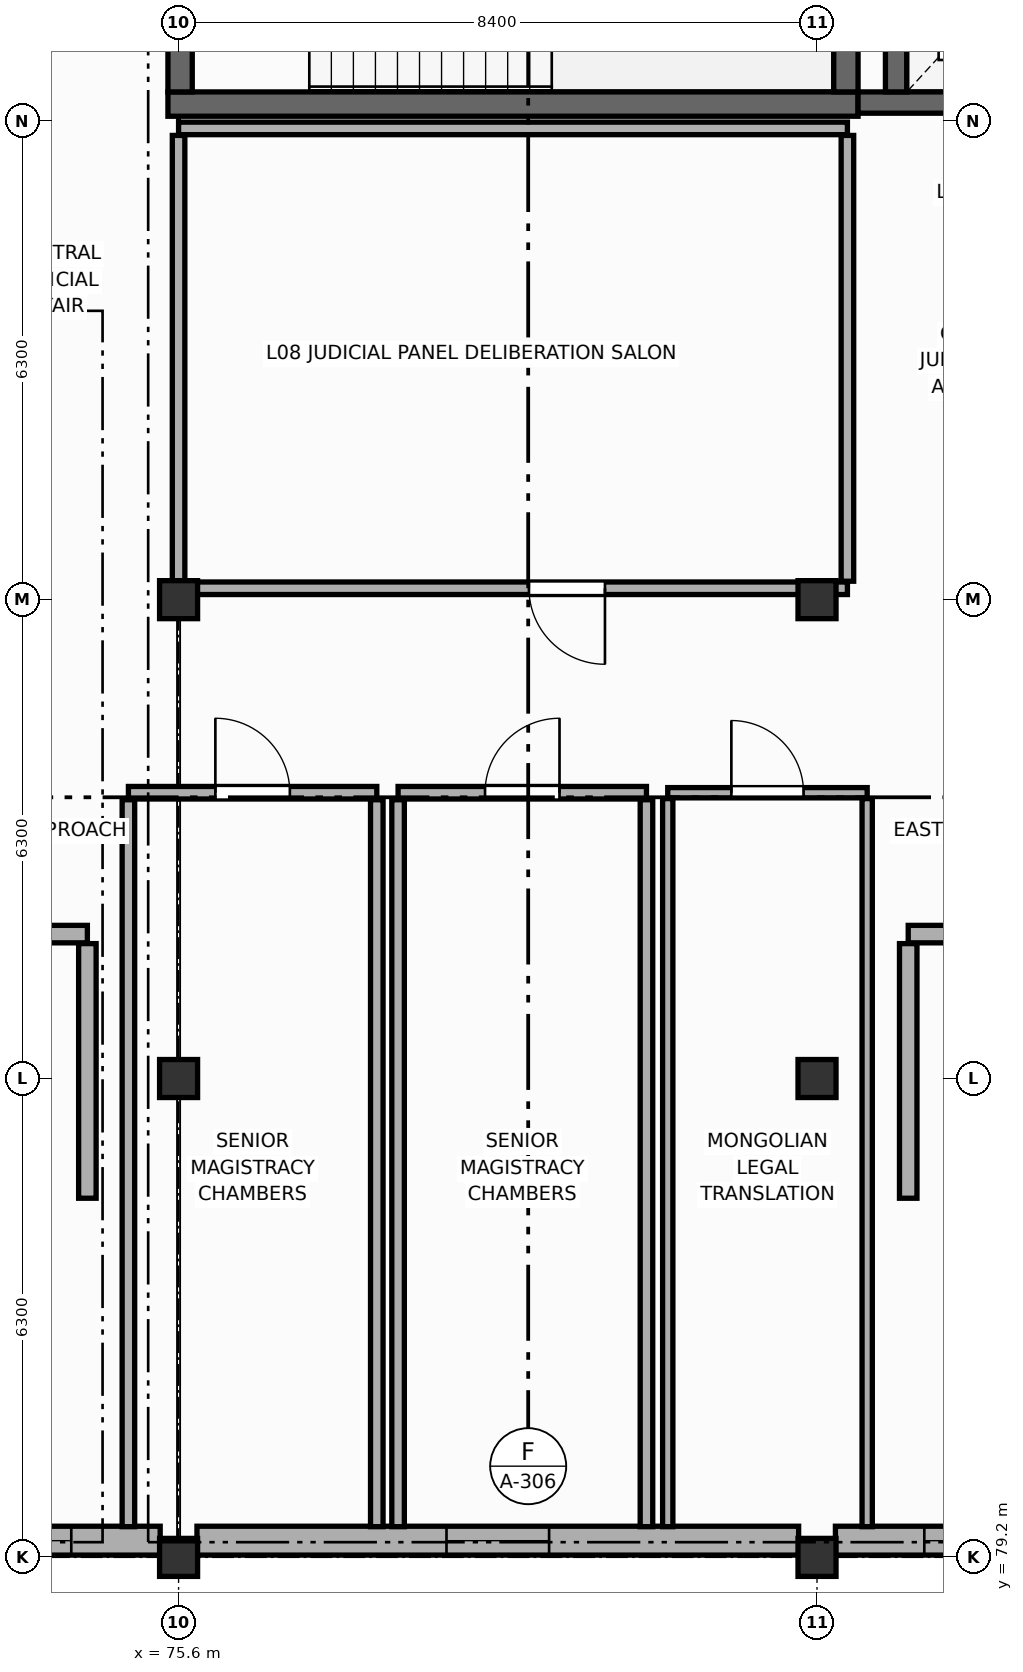
"""IFC4 building model, lengths in metres.
Left out: names, types, materials, properties, quantities, classifications, styles, units other than length and angle.
Written with IfcOpenShell. Run it as: python <this file> out.ifc"""

import sys

from ifc_helpers import new_model, si_unit, direction, frame, frame_2d, origin, origin_2d, place, context, subcontext, project, spatial, rectangle, extrude, element, fill, save


model = new_model("IFC4")
c1 = context("Model", 3, precision=1e-05, world=origin(), true_north=direction((0.0, 1.0)))
c2 = subcontext(c1, "Body", "Model", "MODEL_VIEW")
j1 = project(units=[si_unit("LENGTHUNIT", "METRE"), si_unit("PLANEANGLEUNIT", "RADIAN")], contexts=[c1])
p1 = place(None, origin())
s1 = spatial("IfcSite", under=j1, at=p1, CompositionType="ELEMENT")
p2 = place(p1, origin())
s2 = spatial("IfcBuilding", under=s1, at=p2, CompositionType="ELEMENT")
p3 = place(p2, frame((0.0, 0.0, 31.2)))
s3 = spatial("IfcBuildingStorey", under=s2, at=p3, CompositionType="ELEMENT", Elevation=31.2)
for number, where, z_axis, x_axis in (
    (1, (75.6, 79.2, 0.0), (0.0, 0.0, 1.0), (1.0, 0.0, 0.0)),
    (2, (75.6, 91.8, 0.0), (0.0, 0.0, 1.0), (1.0, 0.0, 0.0)),
    (3, (75.6, 85.5, 0.0), (0.0, 0.0, 1.0), (1.0, 0.0, 0.0)),
    (4, (84.0, 79.2, 0.0), (0.0, 0.0, 1.0), (1.0, 0.0, 0.0)),
    (5, (84.0, 91.8, 0.0), (0.0, 0.0, 1.0), (1.0, 0.0, 0.0)),
    (6, (84.0, 85.5, 0.0), (0.0, 0.0, 1.0), (1.0, 0.0, 0.0)),
):
    element("IfcColumn", number, at=place(p3, frame(where, z_axis=z_axis, x_axis=x_axis)), inside=s3, PredefinedType="COLUMN", context=c2, shape_type="SweptSolid", body=[
        extrude(rectangle(XDim=0.5, YDim=0.5, at=origin_2d()), origin(), (0.0, 0.0, 1.0), 4.2),
    ])
p4 = place(p3, frame((75.358, 79.42, 0.0), z_axis=(0.0, 0.0, 1.0), x_axis=(-1.0, 0.0, 0.0)))
e7 = element("IfcWall", 7, at=p4, inside=s3, PredefinedType="STANDARD", context=c2, shape_type="SweptSolid", body=[
    extrude(rectangle(XDim=7.916, YDim=0.38, at=frame_2d((3.958, 0.0))), origin(), (0.0, 0.0, 1.0), 3.51),
])
p5 = place(p4, frame((1.17, 0.0, 0.85)))
e8 = element("IfcOpeningElement", 8, at=p5, cuts=e7, PredefinedType="OPENING", context=c2, shape_type="SweptSolid", body=[
    extrude(rectangle(XDim=1.35, YDim=1.95, at=frame_2d((0.675, 0.975))), frame((0.0, 0.2, 0.0), z_axis=(0.0, -1.0, 0.0), x_axis=(1.0, 0.0, 0.0)), (0.0, 0.0, 1.0), 0.4),
])
p6 = place(p4, frame((3.283, 0.0, 0.85)))
e9 = element("IfcOpeningElement", 9, at=p6, cuts=e7, PredefinedType="OPENING", context=c2, shape_type="SweptSolid", body=[
    extrude(rectangle(XDim=1.35, YDim=1.95, at=frame_2d((0.675, 0.975))), frame((0.0, 0.2, 0.0), z_axis=(0.0, -1.0, 0.0), x_axis=(1.0, 0.0, 0.0)), (0.0, 0.0, 1.0), 0.4),
])
p7 = place(p4, frame((5.396, 0.0, 0.85)))
e10 = element("IfcOpeningElement", 10, at=p7, cuts=e7, PredefinedType="OPENING", context=c2, shape_type="SweptSolid", body=[
    extrude(rectangle(XDim=1.35, YDim=1.95, at=frame_2d((0.675, 0.975))), frame((0.0, 0.2, 0.0), z_axis=(0.0, -1.0, 0.0), x_axis=(1.0, 0.0, 0.0)), (0.0, 0.0, 1.0), 0.4),
])
p8 = place(p3, frame((83.758, 79.42, 0.0), z_axis=(0.0, 0.0, 1.0), x_axis=(-1.0, 0.0, 0.0)))
e11 = element("IfcWall", 11, at=p8, inside=s3, PredefinedType="STANDARD", context=c2, shape_type="SweptSolid", body=[
    extrude(rectangle(XDim=7.916, YDim=0.38, at=frame_2d((3.958, 0.0))), origin(), (0.0, 0.0, 1.0), 3.51),
])
p9 = place(p8, frame((3.283, 0.0, 0.85)))
e12 = element("IfcOpeningElement", 12, at=p9, cuts=e11, PredefinedType="OPENING", context=c2, shape_type="SweptSolid", body=[
    extrude(rectangle(XDim=1.35, YDim=1.95, at=frame_2d((0.675, 0.975))), frame((0.0, 0.2, 0.0), z_axis=(0.0, -1.0, 0.0), x_axis=(1.0, 0.0, 0.0)), (0.0, 0.0, 1.0), 0.4),
])
p10 = place(p3, frame((92.158, 79.42, 0.0), z_axis=(0.0, 0.0, 1.0), x_axis=(-1.0, 0.0, 0.0)))
e13 = element("IfcWall", 13, at=p10, inside=s3, PredefinedType="STANDARD", context=c2, shape_type="SweptSolid", body=[
    extrude(rectangle(XDim=7.916, YDim=0.38, at=frame_2d((3.958, 0.0))), origin(), (0.0, 0.0, 1.0), 3.51),
])
p11 = place(p10, frame((1.17, 0.0, 0.85)))
e14 = element("IfcOpeningElement", 14, at=p11, cuts=e13, PredefinedType="OPENING", context=c2, shape_type="SweptSolid", body=[
    extrude(rectangle(XDim=1.35, YDim=1.95, at=frame_2d((0.675, 0.975))), frame((0.0, 0.2, 0.0), z_axis=(0.0, -1.0, 0.0), x_axis=(1.0, 0.0, 0.0)), (0.0, 0.0, 1.0), 0.4),
])
p12 = place(p10, frame((3.283, 0.0, 0.85)))
e15 = element("IfcOpeningElement", 15, at=p12, cuts=e13, PredefinedType="OPENING", context=c2, shape_type="SweptSolid", body=[
    extrude(rectangle(XDim=1.35, YDim=1.95, at=frame_2d((0.675, 0.975))), frame((0.0, 0.2, 0.0), z_axis=(0.0, -1.0, 0.0), x_axis=(1.0, 0.0, 0.0)), (0.0, 0.0, 1.0), 0.4),
])
p13 = place(p10, frame((5.396, 0.0, 0.85)))
e16 = element("IfcOpeningElement", 16, at=p13, cuts=e13, PredefinedType="OPENING", context=c2, shape_type="SweptSolid", body=[
    extrude(rectangle(XDim=1.35, YDim=1.95, at=frame_2d((0.675, 0.975))), frame((0.0, 0.2, 0.0), z_axis=(0.0, -1.0, 0.0), x_axis=(1.0, 0.0, 0.0)), (0.0, 0.0, 1.0), 0.4),
])
p14 = place(p3, frame((84.54, 98.32, 0.0), z_axis=(0.0, 0.0, 1.0), x_axis=(-1.0, 0.0, 0.0)))
e17 = element("IfcWall", 17, at=p14, inside=s3, PredefinedType="SHEAR", context=c2, shape_type="SweptSolid", body=[
    extrude(rectangle(XDim=9.08, YDim=0.32, at=frame_2d((4.54, 0.0))), origin(), (0.0, 0.0, 1.0), 3.98),
])
p15 = place(p3, frame((75.62, 98.48, 0.0), z_axis=(0.0, 0.0, 1.0), x_axis=(0.0, 1.0, 0.0)))
e18 = element("IfcWall", 18, at=p15, inside=s3, PredefinedType="SHEAR", context=c2, shape_type="SweptSolid", body=[
    extrude(rectangle(XDim=3.28, YDim=0.32, at=frame_2d((1.64, 0.0))), origin(), (0.0, 0.0, 1.0), 3.98),
])
p16 = place(p15, frame((1.065, 0.0, 0.0)))
e19 = element("IfcOpeningElement", 19, at=p16, cuts=e18, PredefinedType="OPENING", context=c2, shape_type="SweptSolid", body=[
    extrude(rectangle(XDim=1.15, YDim=2.2, at=frame_2d((0.575, 1.1))), frame((0.0, 0.17, 0.0), z_axis=(0.0, -1.0, 0.0), x_axis=(1.0, 0.0, 0.0)), (0.0, 0.0, 1.0), 0.34),
])
p17 = place(p3, frame((84.38, 101.76, 0.0), z_axis=(0.0, 0.0, 1.0), x_axis=(0.0, -1.0, 0.0)))
e20 = element("IfcWall", 20, at=p17, inside=s3, PredefinedType="SHEAR", context=c2, shape_type="SweptSolid", body=[
    extrude(rectangle(XDim=3.28, YDim=0.32, at=frame_2d((1.64, 0.0))), origin(), (0.0, 0.0, 1.0), 3.98),
])
p18 = place(p3, frame((87.7, 98.34, 0.0), z_axis=(0.0, 0.0, 1.0), x_axis=(-1.0, 0.0, 0.0)))
e21 = element("IfcWall", 21, at=p18, inside=s3, PredefinedType="SHEAR", context=c2, shape_type="SweptSolid", body=[
    extrude(rectangle(XDim=3.16, YDim=0.28, at=frame_2d((1.58, 0.0))), origin(), (0.0, 0.0, 1.0), 3.98),
])
p19 = place(p18, frame((0.925, 0.0, 0.0)))
e22 = element("IfcOpeningElement", 22, at=p19, cuts=e21, PredefinedType="OPENING", context=c2, shape_type="SweptSolid", body=[
    extrude(rectangle(XDim=0.95, YDim=2.15, at=frame_2d((0.475, 1.075))), frame((0.0, 0.15, 0.0), z_axis=(0.0, -1.0, 0.0), x_axis=(1.0, 0.0, 0.0)), (0.0, 0.0, 1.0), 0.3),
])
p20 = place(p3, frame((85.04, 98.48, 0.0), z_axis=(0.0, 0.0, 1.0), x_axis=(0.0, 1.0, 0.0)))
e23 = element("IfcWall", 23, at=p20, inside=s3, PredefinedType="SHEAR", context=c2, shape_type="SweptSolid", body=[
    extrude(rectangle(XDim=2.44, YDim=0.28, at=frame_2d((1.22, 0.0))), origin(), (0.0, 0.0, 1.0), 3.98),
])
p21 = place(p3, frame((69.0, 87.4, 0.0), z_axis=(0.0, 0.0, 1.0), x_axis=(1.0, 0.0, 0.0)))
e24 = element("IfcWall", 24, at=p21, inside=s3, PredefinedType="STANDARD", context=c2, shape_type="SweptSolid", body=[
    extrude(rectangle(XDim=5.4, YDim=0.23, at=frame_2d((2.7, 0.0))), origin(), (0.0, 0.0, 1.0), 3.965),
])
p22 = place(p21, frame((2.05, 0.0, 0.0)))
e25 = element("IfcOpeningElement", 25, at=p22, cuts=e24, PredefinedType="OPENING", context=c2, shape_type="SweptSolid", body=[
    extrude(rectangle(XDim=1.3, YDim=2.2, at=frame_2d((0.65, 1.1))), frame((0.0, 0.125, 0.0), z_axis=(0.0, -1.0, 0.0), x_axis=(1.0, 0.0, 0.0)), (0.0, 0.0, 1.0), 0.25),
])
p23 = place(p3, frame((74.4, 87.275, 0.0), z_axis=(0.0, 0.0, 1.0), x_axis=(0.0, -1.0, 0.0)))
e26 = element("IfcWall", 26, at=p23, inside=s3, PredefinedType="STANDARD", context=c2, shape_type="SweptSolid", body=[
    extrude(rectangle(XDim=3.35, YDim=0.23, at=frame_2d((1.675, 0.0))), origin(), (0.0, 0.0, 1.0), 3.41),
])
p24 = place(p3, frame((85.2, 87.4, 0.0), z_axis=(0.0, 0.0, 1.0), x_axis=(1.0, 0.0, 0.0)))
e27 = element("IfcWall", 27, at=p24, inside=s3, PredefinedType="STANDARD", context=c2, shape_type="SweptSolid", body=[
    extrude(rectangle(XDim=5.4, YDim=0.23, at=frame_2d((2.7, 0.0))), origin(), (0.0, 0.0, 1.0), 3.965),
])
p25 = place(p24, frame((2.05, 0.0, 0.0)))
e28 = element("IfcOpeningElement", 28, at=p25, cuts=e27, PredefinedType="OPENING", context=c2, shape_type="SweptSolid", body=[
    extrude(rectangle(XDim=1.3, YDim=2.2, at=frame_2d((0.65, 1.1))), frame((0.0, 0.125, 0.0), z_axis=(0.0, -1.0, 0.0), x_axis=(1.0, 0.0, 0.0)), (0.0, 0.0, 1.0), 0.25),
])
p26 = place(p3, frame((85.2, 83.925, 0.0), z_axis=(0.0, 0.0, 1.0), x_axis=(0.0, 1.0, 0.0)))
e29 = element("IfcWall", 29, at=p26, inside=s3, PredefinedType="STANDARD", context=c2, shape_type="SweptSolid", body=[
    extrude(rectangle(XDim=3.35, YDim=0.23, at=frame_2d((1.675, 0.0))), origin(), (0.0, 0.0, 1.0), 3.41),
])
p27 = place(p3, frame((75.6, 98.0, 0.0), z_axis=(0.0, 0.0, 1.0), x_axis=(1.0, 0.0, 0.0)))
e30 = element("IfcWall", 30, at=p27, inside=s3, PredefinedType="PARTITIONING", context=c2, shape_type="SweptSolid", body=[
    extrude(rectangle(XDim=8.8, YDim=0.165, at=frame_2d((4.4, 0.0))), origin(), (0.0, 0.0, 1.0), 3.11),
])
p28 = place(p3, frame((84.4, 91.95, 0.0), z_axis=(0.0, 0.0, 1.0), x_axis=(-1.0, 0.0, 0.0)))
e31 = element("IfcWall", 31, at=p28, inside=s3, PredefinedType="PARTITIONING", context=c2, shape_type="SweptSolid", body=[
    extrude(rectangle(XDim=8.8, YDim=0.165, at=frame_2d((4.4, 0.0))), origin(), (0.0, 0.0, 1.0), 3.11),
])
p29 = place(p28, frame((3.19, 0.0, 0.0)))
e32 = element("IfcOpeningElement", 32, at=p29, cuts=e31, PredefinedType="OPENING", context=c2, shape_type="SweptSolid", body=[
    extrude(rectangle(XDim=1.0, YDim=2.15, at=frame_2d((0.5, 1.075))), frame((0.0, 0.093, 0.0), z_axis=(0.0, -1.0, 0.0), x_axis=(1.0, 0.0, 0.0)), (0.0, 0.0, 1.0), 0.185),
])
for number, where, z_axis, x_axis in (
    (33, (75.6, 92.042, 0.0), (0.0, 0.0, 1.0), (0.0, 1.0, 0.0)),
    (34, (84.4, 97.907, 0.0), (0.0, 0.0, 1.0), (0.0, -1.0, 0.0)),
):
    element("IfcWall", number, at=place(p3, frame(where, z_axis=z_axis, x_axis=x_axis)), inside=s3, PredefinedType="PARTITIONING", context=c2, shape_type="SweptSolid", body=[
        extrude(rectangle(XDim=5.865, YDim=0.165, at=frame_2d((2.933, 0.0))), origin(), (0.0, 0.0, 1.0), 3.11),
    ])
p30 = place(p3, frame((74.94, 89.26, 0.0), z_axis=(0.0, 0.0, 1.0), x_axis=(1.0, 0.0, 0.0)))
e35 = element("IfcWall", 35, at=p30, inside=s3, PredefinedType="PARTITIONING", context=c2, shape_type="SweptSolid", body=[
    extrude(rectangle(XDim=3.268, YDim=0.165, at=frame_2d((1.634, 0.0))), origin(), (0.0, 0.0, 1.0), 3.51),
])
p31 = place(p30, frame((1.144, 0.0, 0.0)))
e36 = element("IfcOpeningElement", 36, at=p31, cuts=e35, PredefinedType="OPENING", context=c2, shape_type="SweptSolid", body=[
    extrude(rectangle(XDim=0.98, YDim=2.2, at=frame_2d((0.49, 1.1))), frame((0.0, 0.093, 0.0), z_axis=(0.0, -1.0, 0.0), x_axis=(1.0, 0.0, 0.0)), (0.0, 0.0, 1.0), 0.185),
])
for number, where, z_axis, x_axis in (
    (37, (74.94, 79.604, 0.0), (0.0, 0.0, 1.0), (0.0, 1.0, 0.0)),
    (38, (78.208, 89.167, 0.0), (0.0, 0.0, 1.0), (0.0, -1.0, 0.0)),
):
    element("IfcWall", number, at=place(p3, frame(where, z_axis=z_axis, x_axis=x_axis)), inside=s3, PredefinedType="PARTITIONING", context=c2, shape_type="SweptSolid", body=[
        extrude(rectangle(XDim=9.563, YDim=0.165, at=frame_2d((4.782, 0.0))), origin(), (0.0, 0.0, 1.0), 3.41),
    ])
p32 = place(p3, frame((78.488, 89.26, 0.0), z_axis=(0.0, 0.0, 1.0), x_axis=(1.0, 0.0, 0.0)))
e39 = element("IfcWall", 39, at=p32, inside=s3, PredefinedType="PARTITIONING", context=c2, shape_type="SweptSolid", body=[
    extrude(rectangle(XDim=3.268, YDim=0.165, at=frame_2d((1.634, 0.0))), origin(), (0.0, 0.0, 1.0), 3.965),
])
p33 = place(p32, frame((1.144, 0.0, 0.0)))
e40 = element("IfcOpeningElement", 40, at=p33, cuts=e39, PredefinedType="OPENING", context=c2, shape_type="SweptSolid", body=[
    extrude(rectangle(XDim=0.98, YDim=2.2, at=frame_2d((0.49, 1.1))), frame((0.0, 0.093, 0.0), z_axis=(0.0, -1.0, 0.0), x_axis=(1.0, 0.0, 0.0)), (0.0, 0.0, 1.0), 0.185),
])
for number, where, z_axis, x_axis in (
    (41, (78.488, 79.604, 0.0), (0.0, 0.0, 1.0), (0.0, 1.0, 0.0)),
    (42, (81.756, 89.167, 0.0), (0.0, 0.0, 1.0), (0.0, -1.0, 0.0)),
):
    element("IfcWall", number, at=place(p3, frame(where, z_axis=z_axis, x_axis=x_axis)), inside=s3, PredefinedType="PARTITIONING", context=c2, shape_type="SweptSolid", body=[
        extrude(rectangle(XDim=9.563, YDim=0.165, at=frame_2d((4.782, 0.0))), origin(), (0.0, 0.0, 1.0), 3.41),
    ])
p34 = place(p3, frame((82.036, 89.26, 0.0), z_axis=(0.0, 0.0, 1.0), x_axis=(1.0, 0.0, 0.0)))
e43 = element("IfcWall", 43, at=p34, inside=s3, PredefinedType="PARTITIONING", context=c2, shape_type="SweptSolid", body=[
    extrude(rectangle(XDim=2.624, YDim=0.135, at=frame_2d((1.312, 0.0))), origin(), (0.0, 0.0, 1.0), 3.51),
])
p35 = place(p34, frame((0.837, 0.0, 0.0)))
e44 = element("IfcOpeningElement", 44, at=p35, cuts=e43, PredefinedType="OPENING", context=c2, shape_type="SweptSolid", body=[
    extrude(rectangle(XDim=0.95, YDim=2.15, at=frame_2d((0.475, 1.075))), frame((0.0, 0.077, 0.0), z_axis=(0.0, -1.0, 0.0), x_axis=(1.0, 0.0, 0.0)), (0.0, 0.0, 1.0), 0.155),
])
for number, where, z_axis, x_axis in (
    (45, (82.036, 79.604, 0.0), (0.0, 0.0, 1.0), (0.0, 1.0, 0.0)),
    (46, (84.66, 89.183, 0.0), (0.0, 0.0, 1.0), (0.0, -1.0, 0.0)),
):
    element("IfcWall", number, at=place(p3, frame(where, z_axis=z_axis, x_axis=x_axis)), inside=s3, PredefinedType="PARTITIONING", context=c2, shape_type="SweptSolid", body=[
        extrude(rectangle(XDim=9.579, YDim=0.135, at=frame_2d((4.789, 0.0))), origin(), (0.0, 0.0, 1.0), 3.41),
    ])
p36 = place(p5, origin())
e47 = element("IfcWindow", 47, at=p36, inside=s3, PartitioningType="SINGLE_PANEL", PredefinedType="WINDOW", context=c2, shape_type="SweptSolid", body=[
    extrude(rectangle(XDim=1.35, YDim=1.95, at=frame_2d((0.675, 0.975))), frame((0.0, 0.03, 0.0), z_axis=(0.0, -1.0, 0.0), x_axis=(1.0, 0.0, 0.0)), (0.0, 0.0, 1.0), 0.06),
])
fill(e8, e47)
p37 = place(p9, origin())
e48 = element("IfcWindow", 48, at=p37, inside=s3, PartitioningType="SINGLE_PANEL", PredefinedType="WINDOW", context=c2, shape_type="SweptSolid", body=[
    extrude(rectangle(XDim=1.35, YDim=1.95, at=frame_2d((0.675, 0.975))), frame((0.0, 0.03, 0.0), z_axis=(0.0, -1.0, 0.0), x_axis=(1.0, 0.0, 0.0)), (0.0, 0.0, 1.0), 0.06),
])
fill(e12, e48)
p38 = place(p13, origin())
e49 = element("IfcWindow", 49, at=p38, inside=s3, PartitioningType="SINGLE_PANEL", PredefinedType="WINDOW", context=c2, shape_type="SweptSolid", body=[
    extrude(rectangle(XDim=1.35, YDim=1.95, at=frame_2d((0.675, 0.975))), frame((0.0, 0.03, 0.0), z_axis=(0.0, -1.0, 0.0), x_axis=(1.0, 0.0, 0.0)), (0.0, 0.0, 1.0), 0.06),
])
fill(e16, e49)
p39 = place(p29, origin())
e50 = element("IfcDoor", 50, at=p39, inside=s3, OperationType="SINGLE_SWING_LEFT", PredefinedType="DOOR", context=c2, shape_type="SweptSolid", body=[
    extrude(rectangle(XDim=1.0, YDim=2.15, at=frame_2d((0.5, 1.075))), frame((0.0, 0.025, 0.0), z_axis=(0.0, -1.0, 0.0), x_axis=(1.0, 0.0, 0.0)), (0.0, 0.0, 1.0), 0.05),
])
fill(e32, e50)
p40 = place(p31, origin())
e51 = element("IfcDoor", 51, at=p40, inside=s3, OperationType="SINGLE_SWING_LEFT", PredefinedType="DOOR", context=c2, shape_type="SweptSolid", body=[
    extrude(rectangle(XDim=0.98, YDim=2.2, at=frame_2d((0.49, 1.1))), frame((0.0, 0.025, 0.0), z_axis=(0.0, -1.0, 0.0), x_axis=(1.0, 0.0, 0.0)), (0.0, 0.0, 1.0), 0.05),
])
fill(e36, e51)
p41 = place(p33, origin())
e52 = element("IfcDoor", 52, at=p41, inside=s3, OperationType="SINGLE_SWING_RIGHT", PredefinedType="DOOR", context=c2, shape_type="SweptSolid", body=[
    extrude(rectangle(XDim=0.98, YDim=2.2, at=frame_2d((0.49, 1.1))), frame((0.0, 0.025, 0.0), z_axis=(0.0, -1.0, 0.0), x_axis=(1.0, 0.0, 0.0)), (0.0, 0.0, 1.0), 0.05),
])
fill(e40, e52)
p42 = place(p35, origin())
e53 = element("IfcDoor", 53, at=p42, inside=s3, OperationType="SINGLE_SWING_LEFT", PredefinedType="DOOR", context=c2, shape_type="SweptSolid", body=[
    extrude(rectangle(XDim=0.95, YDim=2.15, at=frame_2d((0.475, 1.075))), frame((0.0, 0.025, 0.0), z_axis=(0.0, -1.0, 0.0), x_axis=(1.0, 0.0, 0.0)), (0.0, 0.0, 1.0), 0.05),
])
fill(e44, e53)
save(model, sys.argv[1])
